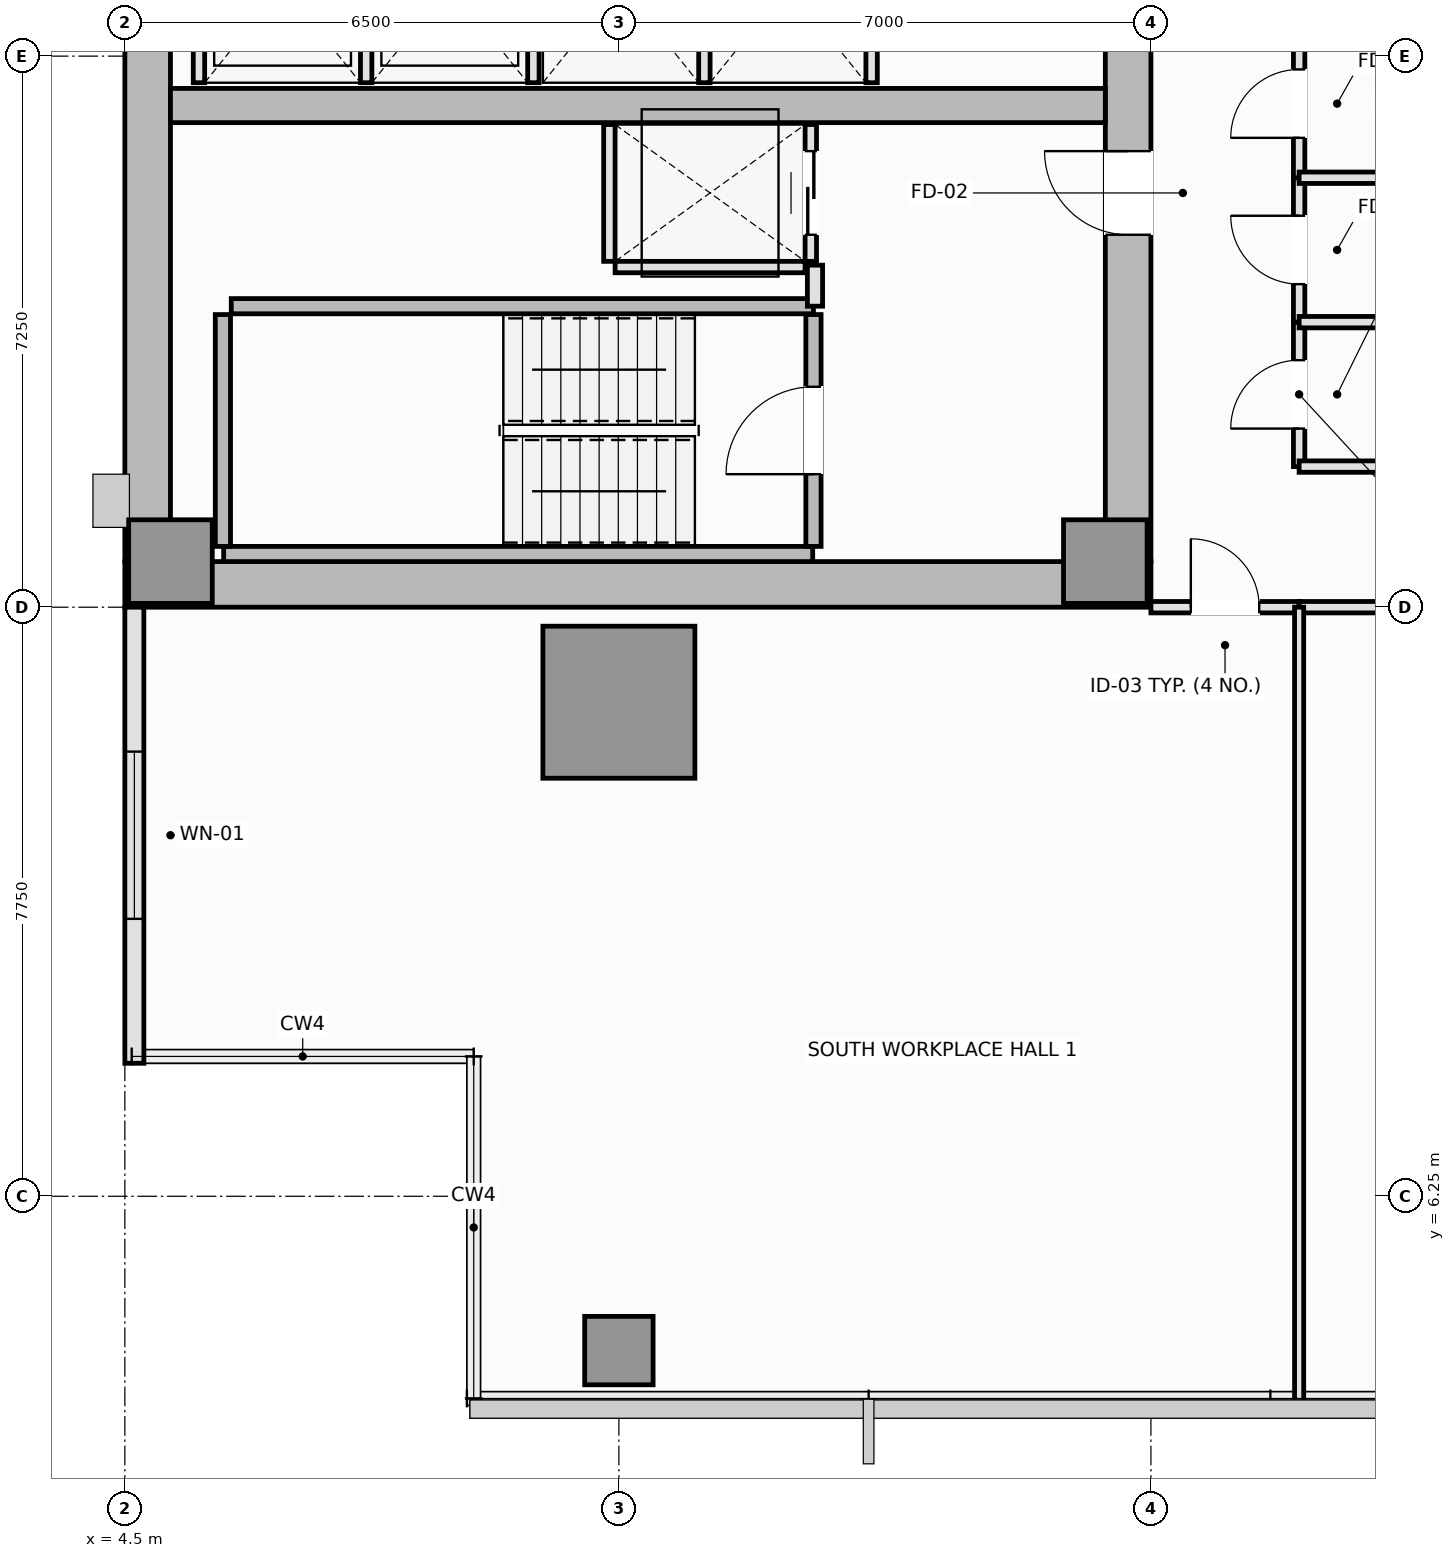
"""IFC4 building model, lengths in metres.
Left out: names, types, materials, properties, quantities, classifications, styles, units other than length and angle.
Written with IfcOpenShell. Run it as: python <this file> out.ifc"""

import sys

from ifc_helpers import new_model, si_unit, direction, frame, frame_2d, origin, origin_2d, place, context, subcontext, project, spatial, rectangle, extrude, element, fill, save


model = new_model("IFC4")
c1 = context("Model", 3, precision=1e-05, world=origin(), true_north=direction((0.0, 1.0)))
c2 = subcontext(c1, "Body", "Model", "MODEL_VIEW")
j1 = project(units=[si_unit("LENGTHUNIT", "METRE"), si_unit("PLANEANGLEUNIT", "RADIAN")], contexts=[c1])
p1 = place(None, origin())
s1 = spatial("IfcSite", under=j1, at=p1, CompositionType="ELEMENT")
p2 = place(p1, origin())
s2 = spatial("IfcBuilding", under=s1, at=p2, CompositionType="ELEMENT")
p3 = place(p2, frame((0.0, 0.0, 169.7)))
s3 = spatial("IfcBuildingStorey", under=s2, at=p3, CompositionType="ELEMENT", Elevation=169.7)
p4 = place(p3, frame((4.5, 14.3, 0.0), z_axis=(0.0, 0.0, 1.0), x_axis=(1.0, 0.0, 0.0)))
e1 = element("IfcWall", 1, at=p4, inside=s3, PredefinedType="SHEAR", context=c2, shape_type="SweptSolid", body=[
    extrude(rectangle(XDim=13.5, YDim=0.6, at=frame_2d((6.75, 0.0))), origin(), (0.0, 0.0, 1.0), 3.55),
])
p5 = place(p3, frame((4.8, 14.6, 0.0), z_axis=(0.0, 0.0, 1.0), x_axis=(0.0, 1.0, 0.0)))
e2 = element("IfcWall", 2, at=p5, inside=s3, PredefinedType="SHEAR", context=c2, shape_type="SweptSolid", body=[
    extrude(rectangle(XDim=21.3, YDim=0.6, at=frame_2d((10.65, 0.0))), origin(), (0.0, 0.0, 1.0), 3.55),
])
p6 = place(p3, frame((17.7, 14.6, 0.0), z_axis=(0.0, 0.0, 1.0), x_axis=(0.0, 1.0, 0.0)))
e3 = element("IfcWall", 3, at=p6, inside=s3, PredefinedType="SHEAR", context=c2, shape_type="SweptSolid", body=[
    extrude(rectangle(XDim=8.85, YDim=0.6, at=frame_2d((4.425, 0.0))), origin(), (0.0, 0.0, 1.0), 3.55),
])
p7 = place(p6, frame((4.3, 0.0, 0.0)))
e4 = element("IfcOpeningElement", 4, at=p7, cuts=e3, PredefinedType="OPENING", context=c2, shape_type="SweptSolid", body=[
    extrude(rectangle(XDim=1.1, YDim=2.15, at=frame_2d((0.55, 1.075))), frame((0.0, 0.31, 0.0), z_axis=(0.0, -1.0, 0.0), x_axis=(1.0, 0.0, 0.0)), (0.0, 0.0, 1.0), 0.62),
])
p8 = place(p3, frame((5.1, 20.6, 0.0), z_axis=(0.0, 0.0, 1.0), x_axis=(1.0, 0.0, 0.0)))
e5 = element("IfcWall", 5, at=p8, inside=s3, PredefinedType="SHEAR", context=c2, shape_type="SweptSolid", body=[
    extrude(rectangle(XDim=12.3, YDim=0.45, at=frame_2d((6.15, 0.0))), origin(), (0.0, 0.0, 1.0), 3.55),
])
for number, where, z_axis, x_axis in (
    (6, (5.1, 14.6, 0.0), (0.0, 0.0, 1.0), (1.0, 0.0, 0.0)),
    (7, (17.4, 14.6, 0.0), (0.0, 0.0, 1.0), (1.0, 0.0, 0.0)),
):
    element("IfcColumn", number, at=place(p3, frame(where, z_axis=z_axis, x_axis=x_axis)), inside=s3, PredefinedType="PILASTER", context=c2, shape_type="SweptSolid", body=[
        extrude(rectangle(XDim=1.1, YDim=1.1, at=origin_2d()), origin(), (0.0, 0.0, 1.0), 3.55),
    ])
p9 = place(p3, frame((11.0, 12.75, 0.0), z_axis=(0.0, 0.0, 1.0), x_axis=(1.0, 0.0, 0.0)))
e8 = element("IfcColumn", 8, at=p9, inside=s3, PredefinedType="COLUMN", context=c2, shape_type="SweptSolid", body=[
    extrude(rectangle(XDim=2.0, YDim=2.0, at=origin_2d()), origin(), (0.0, 0.0, 1.0), 3.55),
])
p10 = place(p3, frame((11.0, 4.22, 0.0), z_axis=(0.0, 0.0, 1.0), x_axis=(1.0, 0.0, 0.0)))
e9 = element("IfcColumn", 9, at=p10, inside=s3, PredefinedType="COLUMN", context=c2, shape_type="SweptSolid", body=[
    extrude(rectangle(XDim=0.9, YDim=0.9, at=origin_2d()), origin(), (0.0, 0.0, 1.0), 3.55),
])
p11 = place(p3, frame((4.625, 14.0, 0.0), z_axis=(0.0, 0.0, 1.0), x_axis=(0.0, -1.0, 0.0)))
e10 = element("IfcWall", 10, at=p11, inside=s3, PredefinedType="SOLIDWALL", context=c2, shape_type="SweptSolid", body=[
    extrude(rectangle(XDim=6.0, YDim=0.25, at=frame_2d((3.0, 0.0))), origin(), (0.0, 0.0, 1.0), 3.35),
])
p12 = place(p11, frame((1.9, 0.0, 0.9)))
e11 = element("IfcOpeningElement", 11, at=p12, cuts=e10, PredefinedType="OPENING", context=c2, shape_type="SweptSolid", body=[
    extrude(rectangle(XDim=2.2, YDim=1.8, at=frame_2d((1.1, 0.9))), frame((0.0, 0.135, 0.0), z_axis=(0.0, -1.0, 0.0), x_axis=(1.0, 0.0, 0.0)), (0.0, 0.0, 1.0), 0.27),
])
p13 = place(p3, frame((5.8, 14.7, 0.0), z_axis=(0.0, 0.0, 1.0), x_axis=(1.0, 0.0, 0.0)))
e12 = element("IfcWall", 12, at=p13, inside=s3, PredefinedType="SOLIDWALL", context=c2, shape_type="SweptSolid", body=[
    extrude(rectangle(XDim=7.75, YDim=0.2, at=frame_2d((3.875, 0.0))), origin(), (0.0, 0.0, 1.0), 3.55),
])
p14 = place(p3, frame((5.79, 14.8, 0.0), z_axis=(0.0, 0.0, 1.0), x_axis=(0.0, 1.0, 0.0)))
e13 = element("IfcWall", 13, at=p14, inside=s3, PredefinedType="SOLIDWALL", context=c2, shape_type="SweptSolid", body=[
    extrude(rectangle(XDim=3.05, YDim=0.2, at=frame_2d((1.525, 0.0))), origin(), (0.0, 0.0, 1.0), 3.55),
])
p15 = place(p3, frame((5.9, 17.96, 0.0), z_axis=(0.0, 0.0, 1.0), x_axis=(1.0, 0.0, 0.0)))
e14 = element("IfcWall", 14, at=p15, inside=s3, PredefinedType="SOLIDWALL", context=c2, shape_type="SweptSolid", body=[
    extrude(rectangle(XDim=7.66, YDim=0.2, at=frame_2d((3.83, 0.0))), origin(), (0.0, 0.0, 1.0), 3.55),
])
p16 = place(p3, frame((13.56, 14.8, 0.0), z_axis=(0.0, 0.0, 1.0), x_axis=(0.0, 1.0, 0.0)))
e15 = element("IfcWall", 15, at=p16, inside=s3, PredefinedType="SOLIDWALL", context=c2, shape_type="SweptSolid", body=[
    extrude(rectangle(XDim=3.05, YDim=0.2, at=frame_2d((1.525, 0.0))), origin(), (0.0, 0.0, 1.0), 3.55),
])
p17 = place(p16, frame((0.95, 0.0, 0.0)))
e16 = element("IfcOpeningElement", 16, at=p17, cuts=e15, PredefinedType="OPENING", context=c2, shape_type="SweptSolid", body=[
    extrude(rectangle(XDim=1.15, YDim=2.15, at=frame_2d((0.575, 1.075))), frame((0.0, 0.11, 0.0), z_axis=(0.0, -1.0, 0.0), x_axis=(1.0, 0.0, 0.0)), (0.0, 0.0, 1.0), 0.22),
])
for number, where, z_axis, x_axis in (
    (17, (5.475, 20.9, 0.0), (0.0, 0.0, 1.0), (0.0, 1.0, 0.0)),
    (18, (7.675, 20.9, 0.0), (0.0, 0.0, 1.0), (0.0, 1.0, 0.0)),
    (19, (9.875, 20.9, 0.0), (0.0, 0.0, 1.0), (0.0, 1.0, 0.0)),
    (20, (12.125, 20.9, 0.0), (0.0, 0.0, 1.0), (0.0, 1.0, 0.0)),
    (21, (14.325, 20.9, 0.0), (0.0, 0.0, 1.0), (0.0, 1.0, 0.0)),
):
    element("IfcWall", number, at=place(p3, frame(where, z_axis=z_axis, x_axis=x_axis)), inside=s3, PredefinedType="PARTITIONING", context=c2, shape_type="SweptSolid", body=[
        extrude(rectangle(XDim=2.55, YDim=0.15, at=frame_2d((1.275, 0.0))), origin(), (0.0, 0.0, 1.0), 3.35),
    ])
p18 = place(p3, frame((10.95, 18.475, 0.0), z_axis=(0.0, 0.0, 1.0), x_axis=(1.0, 0.0, 0.0)))
e22 = element("IfcWall", 22, at=p18, inside=s3, PredefinedType="PARTITIONING", context=c2, shape_type="SweptSolid", body=[
    extrude(rectangle(XDim=2.5, YDim=0.15, at=frame_2d((1.25, 0.0))), origin(), (0.0, 0.0, 1.0), 3.35),
])
p19 = place(p3, frame((10.875, 18.55, 0.0), z_axis=(0.0, 0.0, 1.0), x_axis=(0.0, 1.0, 0.0)))
e23 = element("IfcWall", 23, at=p19, inside=s3, PredefinedType="PARTITIONING", context=c2, shape_type="SweptSolid", body=[
    extrude(rectangle(XDim=1.8, YDim=0.15, at=frame_2d((0.9, 0.0))), origin(), (0.0, 0.0, 1.0), 3.35),
])
p20 = place(p3, frame((13.525, 18.55, 0.0), z_axis=(0.0, 0.0, 1.0), x_axis=(0.0, 1.0, 0.0)))
e24 = element("IfcWall", 24, at=p20, inside=s3, PredefinedType="PARTITIONING", context=c2, shape_type="SweptSolid", body=[
    extrude(rectangle(XDim=1.8, YDim=0.15, at=frame_2d((0.9, 0.0))), origin(), (0.0, 0.0, 1.0), 3.35),
])
p21 = place(p20, frame((0.35, 0.0, 0.0)))
e25 = element("IfcOpeningElement", 25, at=p21, cuts=e24, PredefinedType="OPENING", context=c2, shape_type="SweptSolid", body=[
    extrude(rectangle(XDim=1.1, YDim=2.2, at=frame_2d((0.55, 1.1))), frame((0.0, 0.085, 0.0), z_axis=(0.0, -1.0, 0.0), x_axis=(1.0, 0.0, 0.0)), (0.0, 0.0, 1.0), 0.17),
])
p22 = place(p3, frame((13.58, 17.96, 0.0), z_axis=(0.0, 0.0, 1.0), x_axis=(0.0, 1.0, 0.0)))
e26 = element("IfcWall", 26, at=p22, inside=s3, PredefinedType="PARTITIONING", context=c2, shape_type="SweptSolid", body=[
    extrude(rectangle(XDim=0.54, YDim=0.2, at=frame_2d((0.27, 0.0))), origin(), (0.0, 0.0, 1.0), 3.35),
])
p23 = place(p3, frame((19.95, 15.85, 0.0), z_axis=(0.0, 0.0, 1.0), x_axis=(0.0, 1.0, 0.0)))
e27 = element("IfcWall", 27, at=p23, inside=s3, PredefinedType="PLUMBINGWALL", context=c2, shape_type="SweptSolid", body=[
    extrude(rectangle(XDim=1.9, YDim=0.15, at=frame_2d((0.95, 0.0))), origin(), (0.0, 0.0, 1.0), 3.35),
])
p24 = place(p23, frame((0.5, 0.0, 0.0)))
e28 = element("IfcOpeningElement", 28, at=p24, cuts=e27, PredefinedType="OPENING", context=c2, shape_type="SweptSolid", body=[
    extrude(rectangle(XDim=0.9, YDim=2.1, at=frame_2d((0.45, 1.05))), frame((0.0, 0.085, 0.0), z_axis=(0.0, -1.0, 0.0), x_axis=(1.0, 0.0, 0.0)), (0.0, 0.0, 1.0), 0.17),
])
p25 = place(p3, frame((19.95, 17.75, 0.0), z_axis=(0.0, 0.0, 1.0), x_axis=(0.0, 1.0, 0.0)))
e29 = element("IfcWall", 29, at=p25, inside=s3, PredefinedType="PLUMBINGWALL", context=c2, shape_type="SweptSolid", body=[
    extrude(rectangle(XDim=1.9, YDim=0.15, at=frame_2d((0.95, 0.0))), origin(), (0.0, 0.0, 1.0), 3.35),
])
p26 = place(p25, frame((0.5, 0.0, 0.0)))
e30 = element("IfcOpeningElement", 30, at=p26, cuts=e29, PredefinedType="OPENING", context=c2, shape_type="SweptSolid", body=[
    extrude(rectangle(XDim=0.9, YDim=2.1, at=frame_2d((0.45, 1.05))), frame((0.0, 0.085, 0.0), z_axis=(0.0, -1.0, 0.0), x_axis=(1.0, 0.0, 0.0)), (0.0, 0.0, 1.0), 0.17),
])
p27 = place(p3, frame((19.95, 19.65, 0.0), z_axis=(0.0, 0.0, 1.0), x_axis=(0.0, 1.0, 0.0)))
e31 = element("IfcWall", 31, at=p27, inside=s3, PredefinedType="PLUMBINGWALL", context=c2, shape_type="SweptSolid", body=[
    extrude(rectangle(XDim=1.95, YDim=0.15, at=frame_2d((0.975, 0.0))), origin(), (0.0, 0.0, 1.0), 3.35),
])
p28 = place(p27, frame((0.525, 0.0, 0.0)))
e32 = element("IfcOpeningElement", 32, at=p28, cuts=e31, PredefinedType="OPENING", context=c2, shape_type="SweptSolid", body=[
    extrude(rectangle(XDim=0.9, YDim=2.1, at=frame_2d((0.45, 1.05))), frame((0.0, 0.085, 0.0), z_axis=(0.0, -1.0, 0.0), x_axis=(1.0, 0.0, 0.0)), (0.0, 0.0, 1.0), 0.17),
])
p29 = place(p3, frame((18.0, 14.0, 0.0), z_axis=(0.0, 0.0, 1.0), x_axis=(1.0, 0.0, 0.0)))
e33 = element("IfcWall", 33, at=p29, inside=s3, PredefinedType="PARTITIONING", context=c2, shape_type="SweptSolid", body=[
    extrude(rectangle(XDim=1.95, YDim=0.15, at=frame_2d((0.975, 0.0))), origin(), (0.0, 0.0, 1.0), 3.35),
])
p30 = place(p29, frame((0.525, 0.0, 0.0)))
e34 = element("IfcOpeningElement", 34, at=p30, cuts=e33, PredefinedType="OPENING", context=c2, shape_type="SweptSolid", body=[
    extrude(rectangle(XDim=0.9, YDim=2.1, at=frame_2d((0.45, 1.05))), frame((0.0, 0.085, 0.0), z_axis=(0.0, -1.0, 0.0), x_axis=(1.0, 0.0, 0.0)), (0.0, 0.0, 1.0), 0.17),
])
p31 = place(p3, frame((19.95, 15.85, 0.0), z_axis=(0.0, 0.0, 1.0), x_axis=(1.0, 0.0, 0.0)))
e35 = element("IfcWall", 35, at=p31, inside=s3, PredefinedType="PLUMBINGWALL", context=c2, shape_type="SweptSolid", body=[
    extrude(rectangle(XDim=3.65, YDim=0.15, at=frame_2d((1.825, 0.0))), origin(), (0.0, 0.0, 1.0), 3.35),
])
p32 = place(p3, frame((19.95, 14.0, 0.0), z_axis=(0.0, 0.0, 1.0), x_axis=(1.0, 0.0, 0.0)))
e36 = element("IfcWall", 36, at=p32, inside=s3, PredefinedType="PARTITIONING", context=c2, shape_type="SweptSolid", body=[
    extrude(rectangle(XDim=7.55, YDim=0.15, at=frame_2d((3.775, 0.0))), origin(), (0.0, 0.0, 1.0), 3.35),
])
p33 = place(p32, frame((3.275, 0.0, 0.0)))
e37 = element("IfcOpeningElement", 37, at=p33, cuts=e36, PredefinedType="OPENING", context=c2, shape_type="SweptSolid", body=[
    extrude(rectangle(XDim=1.0, YDim=2.15, at=frame_2d((0.5, 1.075))), frame((0.0, 0.085, 0.0), z_axis=(0.0, -1.0, 0.0), x_axis=(1.0, 0.0, 0.0)), (0.0, 0.0, 1.0), 0.17),
])
for number, where, z_axis, x_axis in (
    (38, (19.95, 17.75, 0.0), (0.0, 0.0, 1.0), (1.0, 0.0, 0.0)),
    (39, (19.95, 19.65, 0.0), (0.0, 0.0, 1.0), (1.0, 0.0, 0.0)),
):
    element("IfcWall", number, at=place(p3, frame(where, z_axis=z_axis, x_axis=x_axis)), inside=s3, PredefinedType="PLUMBINGWALL", context=c2, shape_type="SweptSolid", body=[
        extrude(rectangle(XDim=3.65, YDim=0.15, at=frame_2d((1.825, 0.0))), origin(), (0.0, 0.0, 1.0), 3.35),
    ])
p34 = place(p3, frame((19.95, 3.51, 0.0), z_axis=(0.0, 0.0, 1.0), x_axis=(0.0, 1.0, 0.0)))
e40 = element("IfcWall", 40, at=p34, inside=s3, PredefinedType="PARTITIONING", context=c2, shape_type="SweptSolid", body=[
    extrude(rectangle(XDim=10.49, YDim=0.12, at=frame_2d((5.245, 0.0))), origin(), (0.0, 0.0, 1.0), 3.35),
])
p35 = place(p12, origin())
e41 = element("IfcWindow", 41, at=p35, inside=s3, PartitioningType="SINGLE_PANEL", PredefinedType="WINDOW", context=c2, shape_type="SweptSolid", body=[
    extrude(rectangle(XDim=2.2, YDim=1.8, at=frame_2d((1.1, 0.9))), frame((0.0, 0.03, 0.0), z_axis=(0.0, -1.0, 0.0), x_axis=(1.0, 0.0, 0.0)), (0.0, 0.0, 1.0), 0.06),
])
fill(e11, e41)
p36 = place(p17, origin())
e42 = element("IfcDoor", 42, at=p36, inside=s3, OperationType="SINGLE_SWING_LEFT", PredefinedType="DOOR", context=c2, shape_type="SweptSolid", body=[
    extrude(rectangle(XDim=1.15, YDim=2.15, at=frame_2d((0.575, 1.075))), frame((0.0, 0.025, 0.0), z_axis=(0.0, -1.0, 0.0), x_axis=(1.0, 0.0, 0.0)), (0.0, 0.0, 1.0), 0.05),
])
fill(e16, e42)
p37 = place(p21, origin())
e43 = element("IfcDoor", 43, at=p37, inside=s3, OperationType="DOUBLE_DOOR_SLIDING", PredefinedType="DOOR", context=c2, shape_type="SweptSolid", body=[
    extrude(rectangle(XDim=1.1, YDim=2.2, at=frame_2d((0.55, 1.1))), frame((0.0, 0.025, 0.0), z_axis=(0.0, -1.0, 0.0), x_axis=(1.0, 0.0, 0.0)), (0.0, 0.0, 1.0), 0.05),
])
fill(e25, e43)
p38 = place(p7, origin())
e44 = element("IfcDoor", 44, at=p38, inside=s3, OperationType="SINGLE_SWING_RIGHT", PredefinedType="DOOR", context=c2, shape_type="SweptSolid", body=[
    extrude(rectangle(XDim=1.1, YDim=2.15, at=frame_2d((0.55, 1.075))), frame((0.0, 0.025, 0.0), z_axis=(0.0, -1.0, 0.0), x_axis=(1.0, 0.0, 0.0)), (0.0, 0.0, 1.0), 0.05),
])
fill(e4, e44)
p39 = place(p24, origin())
e45 = element("IfcDoor", 45, at=p39, inside=s3, OperationType="SINGLE_SWING_LEFT", PredefinedType="DOOR", context=c2, shape_type="SweptSolid", body=[
    extrude(rectangle(XDim=0.9, YDim=2.1, at=frame_2d((0.45, 1.05))), frame((0.0, 0.025, 0.0), z_axis=(0.0, -1.0, 0.0), x_axis=(1.0, 0.0, 0.0)), (0.0, 0.0, 1.0), 0.05),
])
fill(e28, e45)
p40 = place(p26, origin())
e46 = element("IfcDoor", 46, at=p40, inside=s3, OperationType="SINGLE_SWING_RIGHT", PredefinedType="DOOR", context=c2, shape_type="SweptSolid", body=[
    extrude(rectangle(XDim=0.9, YDim=2.1, at=frame_2d((0.45, 1.05))), frame((0.0, 0.025, 0.0), z_axis=(0.0, -1.0, 0.0), x_axis=(1.0, 0.0, 0.0)), (0.0, 0.0, 1.0), 0.05),
])
fill(e30, e46)
p41 = place(p28, origin())
e47 = element("IfcDoor", 47, at=p41, inside=s3, OperationType="SINGLE_SWING_LEFT", PredefinedType="DOOR", context=c2, shape_type="SweptSolid", body=[
    extrude(rectangle(XDim=0.9, YDim=2.1, at=frame_2d((0.45, 1.05))), frame((0.0, 0.025, 0.0), z_axis=(0.0, -1.0, 0.0), x_axis=(1.0, 0.0, 0.0)), (0.0, 0.0, 1.0), 0.05),
])
fill(e32, e47)
p42 = place(p30, origin())
e48 = element("IfcDoor", 48, at=p42, inside=s3, OperationType="SINGLE_SWING_LEFT", PredefinedType="DOOR", context=c2, shape_type="SweptSolid", body=[
    extrude(rectangle(XDim=0.9, YDim=2.1, at=frame_2d((0.45, 1.05))), frame((0.0, 0.025, 0.0), z_axis=(0.0, -1.0, 0.0), x_axis=(1.0, 0.0, 0.0)), (0.0, 0.0, 1.0), 0.05),
])
fill(e34, e48)
save(model, sys.argv[1])
